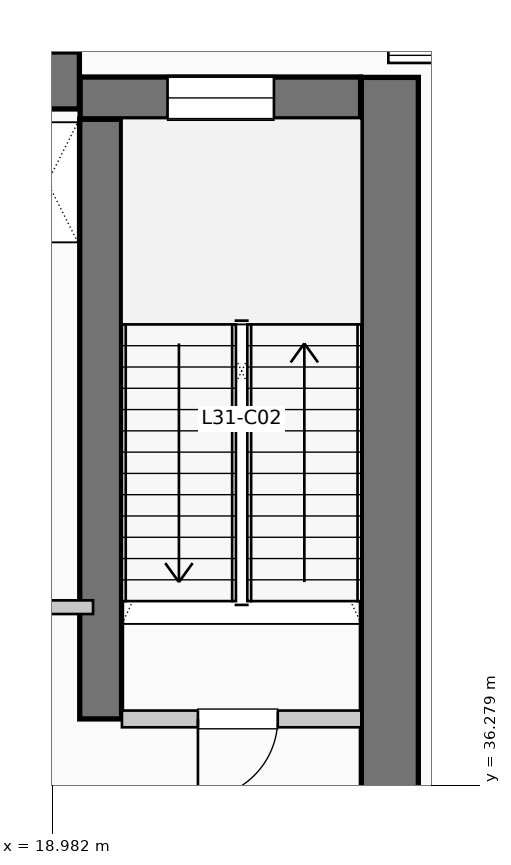
"""IFC4 building model, lengths in metres.
Left out: names, types, materials, properties, quantities, classifications, styles, units other than length and angle.
Written with IfcOpenShell. Run it as: python <this file> out.ifc"""

import sys

from ifc_helpers import new_model, si_unit, direction, frame, frame_2d, origin, place, context, subcontext, project, spatial, rectangle, extrude, element, fill, save


model = new_model("IFC4")
c1 = context("Model", 3, precision=1e-05, world=origin(), true_north=direction((0.0, 1.0)))
c2 = subcontext(c1, "Body", "Model", "MODEL_VIEW")
j1 = project(units=[si_unit("LENGTHUNIT", "METRE"), si_unit("PLANEANGLEUNIT", "RADIAN")], contexts=[c1])
p1 = place(None, origin())
s1 = spatial("IfcSite", under=j1, at=p1, CompositionType="ELEMENT")
p2 = place(p1, origin())
s2 = spatial("IfcBuilding", under=s1, at=p2, CompositionType="ELEMENT")
p3 = place(p2, frame((0.0, 0.0, 130.35)))
s3 = spatial("IfcBuildingStorey", under=s2, at=p3, CompositionType="ELEMENT", Elevation=130.35)
p4 = place(p3, frame((5.36, 45.55, 0.0), z_axis=(0.0, 0.0, 1.0), x_axis=(1.0, 0.0, 0.0)))
e1 = element("IfcWall", 1, at=p4, inside=s3, PredefinedType="SHEAR", context=c2, shape_type="SweptSolid", body=[
    extrude(rectangle(XDim=13.98, YDim=0.75, at=frame_2d((6.99, 0.0))), origin(), (0.0, 0.0, 1.0), 4.62),
])
p5 = place(p3, frame((23.425, 34.95, 0.0), z_axis=(0.0, 0.0, 1.0), x_axis=(0.0, 1.0, 0.0)))
e2 = element("IfcWall", 2, at=p5, inside=s3, PredefinedType="SHEAR", context=c2, shape_type="SweptSolid", body=[
    extrude(rectangle(XDim=10.64, YDim=0.75, at=frame_2d((5.32, 0.0))), origin(), (0.0, 0.0, 1.0), 4.62),
])
p6 = place(p3, frame((19.62, 37.15, 0.0), z_axis=(0.0, 0.0, 1.0), x_axis=(0.0, 1.0, 0.0)))
e3 = element("IfcWall", 3, at=p6, inside=s3, PredefinedType="SHEAR", context=c2, shape_type="SweptSolid", body=[
    extrude(rectangle(XDim=7.89, YDim=0.55, at=frame_2d((3.945, 0.0))), origin(), (0.0, 0.0, 1.0), 4.62),
])
p7 = place(p3, frame((19.35, 45.32, 0.0), z_axis=(0.0, 0.0, 1.0), x_axis=(1.0, 0.0, 0.0)))
e4 = element("IfcWall", 4, at=p7, inside=s3, PredefinedType="SHEAR", context=c2, shape_type="SweptSolid", body=[
    extrude(rectangle(XDim=3.69, YDim=0.55, at=frame_2d((1.845, 0.0))), origin(), (0.0, 0.0, 1.0), 4.62),
])
p8 = place(p7, frame((1.15, 0.0, 1.05)))
e5 = element("IfcOpeningElement", 5, at=p8, cuts=e4, PredefinedType="OPENING", context=c2, shape_type="SweptSolid", body=[
    extrude(rectangle(XDim=1.4, YDim=1.8, at=frame_2d((0.7, 0.9))), frame((0.0, 0.285, 0.0), z_axis=(0.0, -1.0, 0.0), x_axis=(1.0, 0.0, 0.0)), (0.0, 0.0, 1.0), 0.57),
])
p9 = place(p3, frame((19.9, 37.15, 0.0), z_axis=(0.0, 0.0, 1.0), x_axis=(1.0, 0.0, 0.0)))
e6 = element("IfcWall", 6, at=p9, inside=s3, PredefinedType="PARTITIONING", context=c2, shape_type="SweptSolid", body=[
    extrude(rectangle(XDim=3.15, YDim=0.22, at=frame_2d((1.575, 0.0))), origin(), (0.0, 0.0, 1.0), 4.37),
])
p10 = place(p9, frame((2.05, 0.0, 0.0), z_axis=(0.0, 0.0, 1.0), x_axis=(-1.0, 0.0, 0.0)))
e7 = element("IfcOpeningElement", 7, at=p10, cuts=e6, PredefinedType="OPENING", context=c2, shape_type="SweptSolid", body=[
    extrude(rectangle(XDim=1.05, YDim=2.15, at=frame_2d((0.525, 1.075))), frame((0.0, 0.12, 0.0), z_axis=(0.0, -1.0, 0.0), x_axis=(1.0, 0.0, 0.0)), (0.0, 0.0, 1.0), 0.24),
])
p11 = place(p3, frame((17.68, 38.62, 0.0), z_axis=(0.0, 0.0, 1.0), x_axis=(1.0, 0.0, 0.0)))
e8 = element("IfcWall", 8, at=p11, inside=s3, PredefinedType="PARTITIONING", context=c2, shape_type="SweptSolid", body=[
    extrude(rectangle(XDim=1.84, YDim=0.18, at=frame_2d((0.92, 0.0))), origin(), (0.0, 0.0, 1.0), 4.37),
])
p12 = place(p11, frame((0.24, 0.0, 0.0)))
e9 = element("IfcOpeningElement", 9, at=p12, cuts=e8, PredefinedType="OPENING", context=c2, shape_type="SweptSolid", body=[
    extrude(rectangle(XDim=0.92, YDim=2.1, at=frame_2d((0.46, 1.05))), frame((0.0, 0.1, 0.0), z_axis=(0.0, -1.0, 0.0), x_axis=(1.0, 0.0, 0.0)), (0.0, 0.0, 1.0), 0.2),
])
p13 = place(p8, origin())
e10 = element("IfcWindow", 10, at=p13, inside=s3, PartitioningType="SINGLE_PANEL", PredefinedType="WINDOW", context=c2, shape_type="SweptSolid", body=[
    extrude(rectangle(XDim=1.4, YDim=1.8, at=frame_2d((0.7, 0.9))), frame((0.0, 0.03, 0.0), z_axis=(0.0, -1.0, 0.0), x_axis=(1.0, 0.0, 0.0)), (0.0, 0.0, 1.0), 0.06),
])
fill(e5, e10)
p14 = place(p10, origin())
e11 = element("IfcDoor", 11, at=p14, inside=s3, OperationType="SINGLE_SWING_LEFT", PredefinedType="DOOR", context=c2, shape_type="SweptSolid", body=[
    extrude(rectangle(XDim=1.05, YDim=2.15, at=frame_2d((0.525, 1.075))), frame((0.0, 0.025, 0.0), z_axis=(0.0, -1.0, 0.0), x_axis=(1.0, 0.0, 0.0)), (0.0, 0.0, 1.0), 0.05),
])
fill(e7, e11)
save(model, sys.argv[1])
